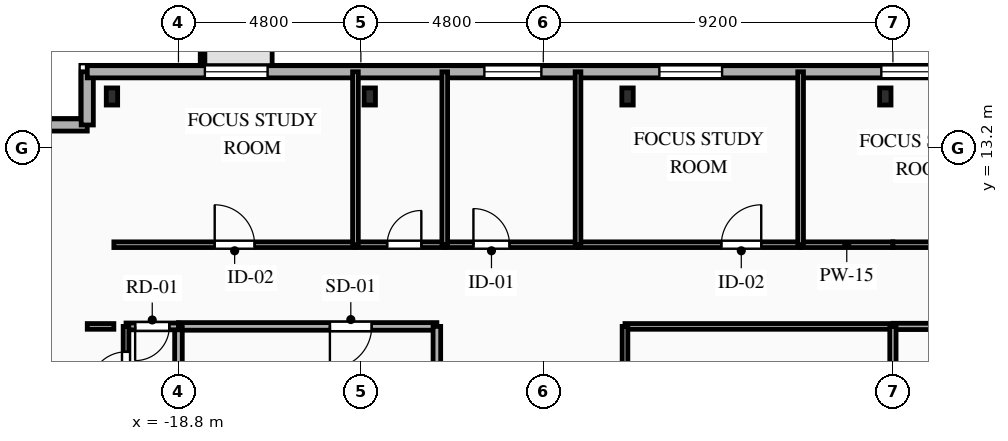
"""IFC4 building model, lengths in metres.
Left out: names, types, materials, properties, quantities, classifications, styles, units other than length and angle.
Written with IfcOpenShell. Run it as: python <this file> out.ifc"""

import sys

from ifc_helpers import new_model, si_unit, direction, frame, frame_2d, origin, origin_2d, place, context, subcontext, project, spatial, rectangle, i_section, extrude, element, fill, save


model = new_model("IFC4")
c1 = context("Model", 3, precision=1e-05, world=origin(), true_north=direction((0.0, 1.0)))
c2 = subcontext(c1, "Body", "Model", "MODEL_VIEW")
j1 = project(units=[si_unit("LENGTHUNIT", "METRE"), si_unit("PLANEANGLEUNIT", "RADIAN")], contexts=[c1])
p1 = place(None, origin())
s1 = spatial("IfcSite", under=j1, at=p1, CompositionType="ELEMENT")
p2 = place(p1, origin())
s2 = spatial("IfcBuilding", under=s1, at=p2, CompositionType="ELEMENT")
p3 = place(p2, frame((0.0, 0.0, 241.7)))
s3 = spatial("IfcBuildingStorey", under=s2, at=p3, CompositionType="ELEMENT", Elevation=241.7)
for number, where, z_axis, x_axis in (
    (1, (-0.2, 14.55, 0.0), (0.0, 0.0, 1.0), (1.0, 0.0, 0.0)),
    (2, (-6.983, 14.55, 0.0), (0.0, 0.0, 1.0), (1.0, 0.0, 0.0)),
    (3, (-13.767, 14.55, 0.0), (0.0, 0.0, 1.0), (1.0, 0.0, 0.0)),
    (4, (-20.55, 14.55, 0.0), (0.0, 0.0, 1.0), (1.0, 0.0, 0.0)),
):
    element("IfcColumn", number, at=place(p3, frame(where, z_axis=z_axis, x_axis=x_axis)), inside=s3, PredefinedType="COLUMN", context=c2, shape_type="SweptSolid", body=[
        extrude(i_section(OverallWidth=0.3, OverallDepth=0.45, WebThickness=0.014, FlangeThickness=0.026, FilletRadius=0.027, at=origin_2d()), origin(), (0.0, 0.0, 1.0), 3.35),
    ])
p4 = place(p3, frame((-22.6, 13.8, 0.0), z_axis=(0.0, 0.0, 1.0), x_axis=(1.0, 0.0, 0.0)))
e5 = element("IfcWall", 5, at=p4, inside=s3, PredefinedType="SOLIDWALL", context=c2, shape_type="SweptSolid", body=[
    extrude(rectangle(XDim=1.4, YDim=0.32, at=frame_2d((0.7, 0.0))), origin(), (0.0, 0.0, 1.0), 3.04),
])
p5 = place(p3, frame((-21.2, 13.8, 0.0), z_axis=(0.0, 0.0, 1.0), x_axis=(0.0, 1.0, 0.0)))
e6 = element("IfcWall", 6, at=p5, inside=s3, PredefinedType="SOLIDWALL", context=c2, shape_type="SweptSolid", body=[
    extrude(rectangle(XDim=1.4, YDim=0.32, at=frame_2d((0.7, 0.0))), origin(), (0.0, 0.0, 1.0), 3.04),
])
p6 = place(p3, frame((-21.2, 15.2, 0.0), z_axis=(0.0, 0.0, 1.0), x_axis=(1.0, 0.0, 0.0)))
e7 = element("IfcWall", 7, at=p6, inside=s3, PredefinedType="SOLIDWALL", context=c2, shape_type="SweptSolid", body=[
    extrude(rectangle(XDim=42.0, YDim=0.32, at=frame_2d((21.0, 0.0))), origin(), (0.0, 0.0, 1.0), 3.04),
])
p7 = place(p6, frame((3.095, 0.0, 0.85)))
e8 = element("IfcOpeningElement", 8, at=p7, cuts=e7, PredefinedType="OPENING", context=c2, shape_type="SweptSolid", body=[
    extrude(rectangle(XDim=1.65, YDim=1.85, at=frame_2d((0.825, 0.925))), frame((0.0, 0.17, 0.0), z_axis=(0.0, -1.0, 0.0), x_axis=(1.0, 0.0, 0.0)), (0.0, 0.0, 1.0), 0.34),
])
p8 = place(p6, frame((10.45, 0.0, 0.85)))
e9 = element("IfcOpeningElement", 9, at=p8, cuts=e7, PredefinedType="OPENING", context=c2, shape_type="SweptSolid", body=[
    extrude(rectangle(XDim=1.5, YDim=1.85, at=frame_2d((0.75, 0.925))), frame((0.0, 0.17, 0.0), z_axis=(0.0, -1.0, 0.0), x_axis=(1.0, 0.0, 0.0)), (0.0, 0.0, 1.0), 0.34),
])
p9 = place(p6, frame((15.055, 0.0, 0.85)))
e10 = element("IfcOpeningElement", 10, at=p9, cuts=e7, PredefinedType="OPENING", context=c2, shape_type="SweptSolid", body=[
    extrude(rectangle(XDim=1.65, YDim=1.85, at=frame_2d((0.825, 0.925))), frame((0.0, 0.17, 0.0), z_axis=(0.0, -1.0, 0.0), x_axis=(1.0, 0.0, 0.0)), (0.0, 0.0, 1.0), 0.34),
])
p10 = place(p6, frame((20.895, 0.0, 0.85)))
e11 = element("IfcOpeningElement", 11, at=p10, cuts=e7, PredefinedType="OPENING", context=c2, shape_type="SweptSolid", body=[
    extrude(rectangle(XDim=1.65, YDim=1.85, at=frame_2d((0.825, 0.925))), frame((0.0, 0.17, 0.0), z_axis=(0.0, -1.0, 0.0), x_axis=(1.0, 0.0, 0.0)), (0.0, 0.0, 1.0), 0.34),
])
p11 = place(p6, frame((26.775, 0.0, 0.85)))
e12 = element("IfcOpeningElement", 12, at=p11, cuts=e7, PredefinedType="OPENING", context=c2, shape_type="SweptSolid", body=[
    extrude(rectangle(XDim=1.65, YDim=1.85, at=frame_2d((0.825, 0.925))), frame((0.0, 0.17, 0.0), z_axis=(0.0, -1.0, 0.0), x_axis=(1.0, 0.0, 0.0)), (0.0, 0.0, 1.0), 0.34),
])
p12 = place(p6, frame((32.655, 0.0, 0.85)))
e13 = element("IfcOpeningElement", 13, at=p12, cuts=e7, PredefinedType="OPENING", context=c2, shape_type="SweptSolid", body=[
    extrude(rectangle(XDim=1.65, YDim=1.85, at=frame_2d((0.825, 0.925))), frame((0.0, 0.17, 0.0), z_axis=(0.0, -1.0, 0.0), x_axis=(1.0, 0.0, 0.0)), (0.0, 0.0, 1.0), 0.34),
])
p13 = place(p6, frame((38.175, 0.0, 0.85)))
e14 = element("IfcOpeningElement", 14, at=p13, cuts=e7, PredefinedType="OPENING", context=c2, shape_type="SweptSolid", body=[
    extrude(rectangle(XDim=1.65, YDim=1.85, at=frame_2d((0.825, 0.925))), frame((0.0, 0.17, 0.0), z_axis=(0.0, -1.0, 0.0), x_axis=(1.0, 0.0, 0.0)), (0.0, 0.0, 1.0), 0.34),
])
p14 = place(p3, frame((-12.0, 8.5, 0.0), z_axis=(0.0, 0.0, 1.0), x_axis=(-1.0, 0.0, 0.0)))
e15 = element("IfcWall", 15, at=p14, inside=s3, PredefinedType="PARTITIONING", context=c2, shape_type="SweptSolid", body=[
    extrude(rectangle(XDim=6.8, YDim=0.2, at=frame_2d((3.4, 0.0))), origin(), (0.0, 0.0, 1.0), 3.04),
])
p15 = place(p14, frame((1.715, 0.0, 0.0)))
e16 = element("IfcOpeningElement", 16, at=p15, cuts=e15, PredefinedType="OPENING", context=c2, shape_type="SweptSolid", body=[
    extrude(rectangle(XDim=1.1, YDim=2.15, at=frame_2d((0.55, 1.075))), frame((0.0, 0.11, 0.0), z_axis=(0.0, -1.0, 0.0), x_axis=(1.0, 0.0, 0.0)), (0.0, 0.0, 1.0), 0.22),
])
p16 = place(p3, frame((-12.0, 5.6, 0.0), z_axis=(0.0, 0.0, 1.0), x_axis=(0.0, 1.0, 0.0)))
e17 = element("IfcWall", 17, at=p16, inside=s3, PredefinedType="PARTITIONING", context=c2, shape_type="SweptSolid", body=[
    extrude(rectangle(XDim=2.9, YDim=0.2, at=frame_2d((1.45, 0.0))), origin(), (0.0, 0.0, 1.0), 3.04),
])
p17 = place(p3, frame((-18.8, 8.5, 0.0), z_axis=(0.0, 0.0, 1.0), x_axis=(0.0, -1.0, 0.0)))
e18 = element("IfcWall", 18, at=p17, inside=s3, PredefinedType="PARTITIONING", context=c2, shape_type="SweptSolid", body=[
    extrude(rectangle(XDim=2.9, YDim=0.2, at=frame_2d((1.45, 0.0))), origin(), (0.0, 0.0, 1.0), 2.665),
])
p18 = place(p3, frame((-18.8, 8.5, 0.0), z_axis=(0.0, 0.0, 1.0), x_axis=(-1.0, 0.0, 0.0)))
e19 = element("IfcWall", 19, at=p18, inside=s3, PredefinedType="PARTITIONING", context=c2, shape_type="SweptSolid", body=[
    extrude(rectangle(XDim=1.38, YDim=0.18, at=frame_2d((0.69, 0.0))), origin(), (0.0, 0.0, 1.0), 3.04),
])
p19 = place(p18, frame((0.24, 0.0, 0.0)))
e20 = element("IfcOpeningElement", 20, at=p19, cuts=e19, PredefinedType="OPENING", context=c2, shape_type="SweptSolid", body=[
    extrude(rectangle(XDim=0.9, YDim=2.1, at=frame_2d((0.45, 1.05))), frame((0.0, 0.1, 0.0), z_axis=(0.0, -1.0, 0.0), x_axis=(1.0, 0.0, 0.0)), (0.0, 0.0, 1.0), 0.2),
])
p20 = place(p3, frame((-20.5, 8.5, 0.0), z_axis=(0.0, 0.0, 1.0), x_axis=(-1.0, 0.0, 0.0)))
e21 = element("IfcWall", 21, at=p20, inside=s3, PredefinedType="PARTITIONING", context=c2, shape_type="SweptSolid", body=[
    extrude(rectangle(XDim=0.7, YDim=0.15, at=frame_2d((0.35, 0.0))), origin(), (0.0, 0.0, 1.0), 3.04),
])
p21 = place(p3, frame((-20.5, 10.65, 0.0), z_axis=(0.0, 0.0, 1.0), x_axis=(1.0, 0.0, 0.0)))
e22 = element("IfcWall", 22, at=p21, inside=s3, PredefinedType="PARTITIONING", context=c2, shape_type="SweptSolid", body=[
    extrude(rectangle(XDim=6.357, YDim=0.15, at=frame_2d((3.178, 0.0))), origin(), (0.0, 0.0, 1.0), 3.04),
])
p22 = place(p21, frame((2.654, 0.0, 0.0)))
e23 = element("IfcOpeningElement", 23, at=p22, cuts=e22, PredefinedType="OPENING", context=c2, shape_type="SweptSolid", body=[
    extrude(rectangle(XDim=1.05, YDim=2.15, at=frame_2d((0.525, 1.075))), frame((0.0, 0.085, 0.0), z_axis=(0.0, -1.0, 0.0), x_axis=(1.0, 0.0, 0.0)), (0.0, 0.0, 1.0), 0.17),
])
p23 = place(p3, frame((-14.143, 10.65, 0.0), z_axis=(0.0, 0.0, 1.0), x_axis=(1.0, 0.0, 0.0)))
e24 = element("IfcWall", 24, at=p23, inside=s3, PredefinedType="PLUMBINGWALL", context=c2, shape_type="SweptSolid", body=[
    extrude(rectangle(XDim=2.35, YDim=0.15, at=frame_2d((1.175, 0.0))), origin(), (0.0, 0.0, 1.0), 3.04),
])
p24 = place(p23, frame((0.834, 0.0, 0.0)))
e25 = element("IfcOpeningElement", 25, at=p24, cuts=e24, PredefinedType="OPENING", context=c2, shape_type="SweptSolid", body=[
    extrude(rectangle(XDim=0.9, YDim=2.1, at=frame_2d((0.45, 1.05))), frame((0.0, 0.085, 0.0), z_axis=(0.0, -1.0, 0.0), x_axis=(1.0, 0.0, 0.0)), (0.0, 0.0, 1.0), 0.17),
])
p25 = place(p3, frame((-11.793, 10.65, 0.0), z_axis=(0.0, 0.0, 1.0), x_axis=(1.0, 0.0, 0.0)))
e26 = element("IfcWall", 26, at=p25, inside=s3, PredefinedType="PARTITIONING", context=c2, shape_type="SweptSolid", body=[
    extrude(rectangle(XDim=3.507, YDim=0.15, at=frame_2d((1.753, 0.0))), origin(), (0.0, 0.0, 1.0), 3.04),
])
p26 = place(p25, frame((0.755, 0.0, 0.0)))
e27 = element("IfcOpeningElement", 27, at=p26, cuts=e26, PredefinedType="OPENING", context=c2, shape_type="SweptSolid", body=[
    extrude(rectangle(XDim=0.95, YDim=2.1, at=frame_2d((0.475, 1.05))), frame((0.0, 0.085, 0.0), z_axis=(0.0, -1.0, 0.0), x_axis=(1.0, 0.0, 0.0)), (0.0, 0.0, 1.0), 0.17),
])
p27 = place(p3, frame((-8.286, 10.65, 0.0), z_axis=(0.0, 0.0, 1.0), x_axis=(1.0, 0.0, 0.0)))
e28 = element("IfcWall", 28, at=p27, inside=s3, PredefinedType="PARTITIONING", context=c2, shape_type="SweptSolid", body=[
    extrude(rectangle(XDim=5.857, YDim=0.15, at=frame_2d((2.928, 0.0))), origin(), (0.0, 0.0, 1.0), 3.04),
])
p28 = place(p27, frame((3.771, 0.0, 0.0)))
e29 = element("IfcOpeningElement", 29, at=p28, cuts=e28, PredefinedType="OPENING", context=c2, shape_type="SweptSolid", body=[
    extrude(rectangle(XDim=1.05, YDim=2.15, at=frame_2d((0.525, 1.075))), frame((0.0, 0.085, 0.0), z_axis=(0.0, -1.0, 0.0), x_axis=(1.0, 0.0, 0.0)), (0.0, 0.0, 1.0), 0.17),
])
p29 = place(p3, frame((-2.429, 10.65, 0.0), z_axis=(0.0, 0.0, 1.0), x_axis=(1.0, 0.0, 0.0)))
e30 = element("IfcWall", 30, at=p29, inside=s3, PredefinedType="PARTITIONING", context=c2, shape_type="SweptSolid", body=[
    extrude(rectangle(XDim=2.429, YDim=0.15, at=frame_2d((1.214, 0.0))), origin(), (0.0, 0.0, 1.0), 3.04),
])
p30 = place(p3, frame((0.0, 8.5, 0.0), z_axis=(0.0, 0.0, 1.0), x_axis=(-1.0, 0.0, 0.0)))
e31 = element("IfcWall", 31, at=p30, inside=s3, PredefinedType="PARTITIONING", context=c2, shape_type="SweptSolid", body=[
    extrude(rectangle(XDim=7.05, YDim=0.15, at=frame_2d((3.525, 0.0))), origin(), (0.0, 0.0, 1.0), 3.04),
])
p31 = place(p3, frame((0.0, 10.65, 0.0), z_axis=(0.0, 0.0, 1.0), x_axis=(1.0, 0.0, 0.0)))
e32 = element("IfcWall", 32, at=p31, inside=s3, PredefinedType="PARTITIONING", context=c2, shape_type="SweptSolid", body=[
    extrude(rectangle(XDim=3.429, YDim=0.15, at=frame_2d((1.714, 0.0))), origin(), (0.0, 0.0, 1.0), 3.04),
])
p32 = place(p31, frame((1.646, 0.0, 0.0)))
e33 = element("IfcOpeningElement", 33, at=p32, cuts=e32, PredefinedType="OPENING", context=c2, shape_type="SweptSolid", body=[
    extrude(rectangle(XDim=1.05, YDim=2.15, at=frame_2d((0.525, 1.075))), frame((0.0, 0.085, 0.0), z_axis=(0.0, -1.0, 0.0), x_axis=(1.0, 0.0, 0.0)), (0.0, 0.0, 1.0), 0.17),
])
p33 = place(p3, frame((7.05, 8.5, 0.0), z_axis=(0.0, 0.0, 1.0), x_axis=(-1.0, 0.0, 0.0)))
e34 = element("IfcWall", 34, at=p33, inside=s3, PredefinedType="PARTITIONING", context=c2, shape_type="SweptSolid", body=[
    extrude(rectangle(XDim=7.05, YDim=0.165, at=frame_2d((3.525, 0.0))), origin(), (0.0, 0.0, 1.0), 3.04),
])
p34 = place(p33, frame((3.542, 0.0, 0.0)))
e35 = element("IfcOpeningElement", 35, at=p34, cuts=e34, PredefinedType="OPENING", context=c2, shape_type="SweptSolid", body=[
    extrude(rectangle(XDim=1.15, YDim=2.15, at=frame_2d((0.575, 1.075))), frame((0.0, 0.093, 0.0), z_axis=(0.0, -1.0, 0.0), x_axis=(1.0, 0.0, 0.0)), (0.0, 0.0, 1.0), 0.185),
])
p35 = place(p3, frame((-7.05, 8.5, 0.0), z_axis=(0.0, 0.0, 1.0), x_axis=(0.0, -1.0, 0.0)))
e36 = element("IfcWall", 36, at=p35, inside=s3, PredefinedType="PARTITIONING", context=c2, shape_type="SweptSolid", body=[
    extrude(rectangle(XDim=14.1, YDim=0.15, at=frame_2d((7.05, 0.0))), origin(), (0.0, 0.0, 1.0), 3.04),
])
p36 = place(p35, frame((8.011, 0.0, 0.0)))
e37 = element("IfcOpeningElement", 37, at=p36, cuts=e36, PredefinedType="OPENING", context=c2, shape_type="SweptSolid", body=[
    extrude(rectangle(XDim=1.05, YDim=2.15, at=frame_2d((0.525, 1.075))), frame((0.0, 0.085, 0.0), z_axis=(0.0, -1.0, 0.0), x_axis=(1.0, 0.0, 0.0)), (0.0, 0.0, 1.0), 0.17),
])
p37 = place(p3, frame((-20.18, 5.68, 0.0), z_axis=(0.0, 0.0, 1.0), x_axis=(0.0, 1.0, 0.0)))
e38 = element("IfcWall", 38, at=p37, inside=s3, PredefinedType="PARTITIONING", context=c2, shape_type="SweptSolid", body=[
    extrude(rectangle(XDim=2.82, YDim=0.15, at=frame_2d((1.41, 0.0))), origin(), (0.0, 0.0, 1.0), 3.04),
])
p38 = place(p37, frame((1.201, 0.0, 0.0)))
e39 = element("IfcOpeningElement", 39, at=p38, cuts=e38, PredefinedType="OPENING", context=c2, shape_type="SweptSolid", body=[
    extrude(rectangle(XDim=0.95, YDim=2.1, at=frame_2d((0.475, 1.05))), frame((0.0, 0.085, 0.0), z_axis=(0.0, -1.0, 0.0), x_axis=(1.0, 0.0, 0.0)), (0.0, 0.0, 1.0), 0.17),
])
for number, where, z_axis, x_axis in (
    (40, (-14.143, 15.2, 0.0), (0.0, 0.0, 1.0), (0.0, -1.0, 0.0)),
    (41, (-11.793, 15.2, 0.0), (0.0, 0.0, 1.0), (0.0, -1.0, 0.0)),
):
    element("IfcWall", number, at=place(p3, frame(where, z_axis=z_axis, x_axis=x_axis)), inside=s3, PredefinedType="PLUMBINGWALL", context=c2, shape_type="SweptSolid", body=[
        extrude(rectangle(XDim=4.55, YDim=0.15, at=frame_2d((2.275, 0.0))), origin(), (0.0, 0.0, 1.0), 3.04),
    ])
for number, where, z_axis, x_axis in (
    (42, (-8.286, 15.2, 0.0), (0.0, 0.0, 1.0), (0.0, -1.0, 0.0)),
    (43, (-2.429, 15.2, 0.0), (0.0, 0.0, 1.0), (0.0, -1.0, 0.0)),
):
    element("IfcWall", number, at=place(p3, frame(where, z_axis=z_axis, x_axis=x_axis)), inside=s3, PredefinedType="PARTITIONING", context=c2, shape_type="SweptSolid", body=[
        extrude(rectangle(XDim=4.55, YDim=0.15, at=frame_2d((2.275, 0.0))), origin(), (0.0, 0.0, 1.0), 3.04),
    ])
p39 = place(p3, frame((0.0, 8.5, 0.0), z_axis=(0.0, 0.0, 1.0), x_axis=(0.0, -1.0, 0.0)))
e44 = element("IfcWall", 44, at=p39, inside=s3, PredefinedType="PARTITIONING", context=c2, shape_type="SweptSolid", body=[
    extrude(rectangle(XDim=7.05, YDim=0.165, at=frame_2d((3.525, 0.0))), origin(), (0.0, 0.0, 1.0), 3.04),
])
p40 = place(p7, origin())
e45 = element("IfcWindow", 45, at=p40, inside=s3, PartitioningType="SINGLE_PANEL", PredefinedType="WINDOW", context=c2, shape_type="SweptSolid", body=[
    extrude(rectangle(XDim=1.65, YDim=1.85, at=frame_2d((0.825, 0.925))), frame((0.0, 0.03, 0.0), z_axis=(0.0, -1.0, 0.0), x_axis=(1.0, 0.0, 0.0)), (0.0, 0.0, 1.0), 0.06),
])
fill(e8, e45)
p41 = place(p8, origin())
e46 = element("IfcWindow", 46, at=p41, inside=s3, PartitioningType="SINGLE_PANEL", PredefinedType="WINDOW", context=c2, shape_type="SweptSolid", body=[
    extrude(rectangle(XDim=1.5, YDim=1.85, at=frame_2d((0.75, 0.925))), frame((0.0, 0.03, 0.0), z_axis=(0.0, -1.0, 0.0), x_axis=(1.0, 0.0, 0.0)), (0.0, 0.0, 1.0), 0.06),
])
fill(e9, e46)
p42 = place(p9, origin())
e47 = element("IfcWindow", 47, at=p42, inside=s3, PartitioningType="SINGLE_PANEL", PredefinedType="WINDOW", context=c2, shape_type="SweptSolid", body=[
    extrude(rectangle(XDim=1.65, YDim=1.85, at=frame_2d((0.825, 0.925))), frame((0.0, 0.03, 0.0), z_axis=(0.0, -1.0, 0.0), x_axis=(1.0, 0.0, 0.0)), (0.0, 0.0, 1.0), 0.06),
])
fill(e10, e47)
p43 = place(p10, origin())
e48 = element("IfcWindow", 48, at=p43, inside=s3, PartitioningType="SINGLE_PANEL", PredefinedType="WINDOW", context=c2, shape_type="SweptSolid", body=[
    extrude(rectangle(XDim=1.65, YDim=1.85, at=frame_2d((0.825, 0.925))), frame((0.0, 0.03, 0.0), z_axis=(0.0, -1.0, 0.0), x_axis=(1.0, 0.0, 0.0)), (0.0, 0.0, 1.0), 0.06),
])
fill(e11, e48)
p44 = place(p15, origin())
e49 = element("IfcDoor", 49, at=p44, inside=s3, OperationType="SINGLE_SWING_RIGHT", PredefinedType="DOOR", context=c2, shape_type="SweptSolid", body=[
    extrude(rectangle(XDim=1.1, YDim=2.15, at=frame_2d((0.55, 1.075))), frame((0.0, 0.025, 0.0), z_axis=(0.0, -1.0, 0.0), x_axis=(1.0, 0.0, 0.0)), (0.0, 0.0, 1.0), 0.05),
])
fill(e16, e49)
p45 = place(p19, origin())
e50 = element("IfcDoor", 50, at=p45, inside=s3, OperationType="SINGLE_SWING_RIGHT", PredefinedType="DOOR", context=c2, shape_type="SweptSolid", body=[
    extrude(rectangle(XDim=0.9, YDim=2.1, at=frame_2d((0.45, 1.05))), frame((0.0, 0.025, 0.0), z_axis=(0.0, -1.0, 0.0), x_axis=(1.0, 0.0, 0.0)), (0.0, 0.0, 1.0), 0.05),
])
fill(e20, e50)
p46 = place(p22, origin())
e51 = element("IfcDoor", 51, at=p46, inside=s3, OperationType="SINGLE_SWING_LEFT", PredefinedType="DOOR", context=c2, shape_type="SweptSolid", body=[
    extrude(rectangle(XDim=1.05, YDim=2.15, at=frame_2d((0.525, 1.075))), frame((0.0, 0.025, 0.0), z_axis=(0.0, -1.0, 0.0), x_axis=(1.0, 0.0, 0.0)), (0.0, 0.0, 1.0), 0.05),
])
fill(e23, e51)
p47 = place(p24, origin())
e52 = element("IfcDoor", 52, at=p47, inside=s3, OperationType="SINGLE_SWING_RIGHT", PredefinedType="DOOR", context=c2, shape_type="SweptSolid", body=[
    extrude(rectangle(XDim=0.9, YDim=2.1, at=frame_2d((0.45, 1.05))), frame((0.0, 0.025, 0.0), z_axis=(0.0, -1.0, 0.0), x_axis=(1.0, 0.0, 0.0)), (0.0, 0.0, 1.0), 0.05),
])
fill(e25, e52)
p48 = place(p26, origin())
e53 = element("IfcDoor", 53, at=p48, inside=s3, OperationType="SINGLE_SWING_LEFT", PredefinedType="DOOR", context=c2, shape_type="SweptSolid", body=[
    extrude(rectangle(XDim=0.95, YDim=2.1, at=frame_2d((0.475, 1.05))), frame((0.0, 0.025, 0.0), z_axis=(0.0, -1.0, 0.0), x_axis=(1.0, 0.0, 0.0)), (0.0, 0.0, 1.0), 0.05),
])
fill(e27, e53)
p49 = place(p28, origin())
e54 = element("IfcDoor", 54, at=p49, inside=s3, OperationType="SINGLE_SWING_RIGHT", PredefinedType="DOOR", context=c2, shape_type="SweptSolid", body=[
    extrude(rectangle(XDim=1.05, YDim=2.15, at=frame_2d((0.525, 1.075))), frame((0.0, 0.025, 0.0), z_axis=(0.0, -1.0, 0.0), x_axis=(1.0, 0.0, 0.0)), (0.0, 0.0, 1.0), 0.05),
])
fill(e29, e54)
p50 = place(p38, origin())
e55 = element("IfcDoor", 55, at=p50, inside=s3, OperationType="SINGLE_SWING_LEFT", PredefinedType="DOOR", context=c2, shape_type="SweptSolid", body=[
    extrude(rectangle(XDim=0.95, YDim=2.1, at=frame_2d((0.475, 1.05))), frame((0.0, 0.025, 0.0), z_axis=(0.0, -1.0, 0.0), x_axis=(1.0, 0.0, 0.0)), (0.0, 0.0, 1.0), 0.05),
])
fill(e39, e55)
save(model, sys.argv[1])
